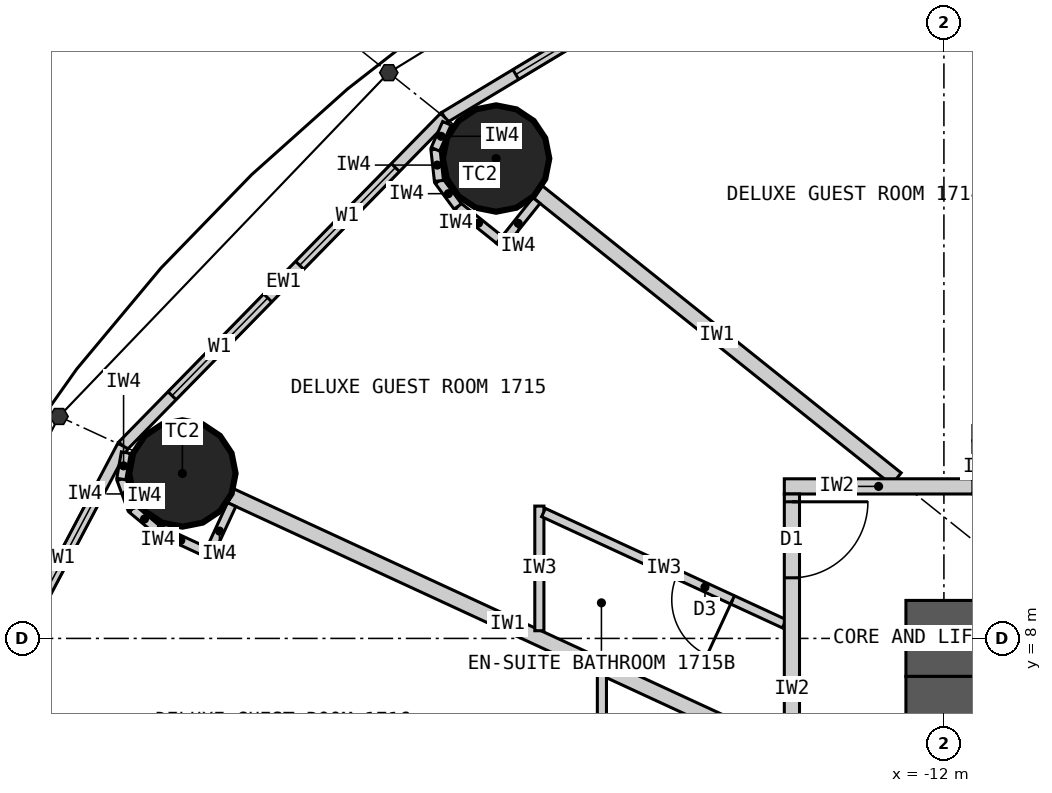
"""IFC4 building model, lengths in metres.
Left out: names, types, materials, properties, quantities, classifications, styles, units other than length and angle.
Written with IfcOpenShell. Run it as: python <this file> out.ifc"""

import sys

from ifc_helpers import new_model, si_unit, direction, frame, frame_2d, origin, origin_2d, place, context, subcontext, project, spatial, rectangle, circle, extrude, element, fill, save


model = new_model("IFC4")
c1 = context("Model", 3, precision=1e-05, world=origin(), true_north=direction((0.0, 1.0)))
c2 = subcontext(c1, "Body", "Model", "MODEL_VIEW")
j1 = project(units=[si_unit("LENGTHUNIT", "METRE"), si_unit("PLANEANGLEUNIT", "RADIAN")], contexts=[c1])
p1 = place(None, origin())
s1 = spatial("IfcSite", under=j1, at=p1, CompositionType="ELEMENT")
p2 = place(p1, origin())
s2 = spatial("IfcBuilding", under=s1, at=p2, CompositionType="ELEMENT")
p3 = place(p2, frame((0.0, 0.0, 70.5)))
s3 = spatial("IfcBuildingStorey", under=s2, at=p3, CompositionType="ELEMENT", Elevation=70.5)
for number, where, z_axis, x_axis in (
    (1, (-17.892, 14.313, 0.0), (0.0, 0.0, 1.0), (1.0, 0.0, 0.0)),
    (2, (-22.019, 10.17, 0.0), (0.0, 0.0, 1.0), (1.0, 0.0, 0.0)),
):
    element("IfcColumn", number, at=place(p3, frame(where, z_axis=z_axis, x_axis=x_axis)), inside=s3, PredefinedType="COLUMN", context=c2, shape_type="SweptSolid", body=[
        extrude(circle(Radius=0.7, at=origin_2d()), origin(), (0.0, 0.0, 1.0), 3.3),
    ])
p4 = place(p3, frame((-12.5, 8.0, 0.0), z_axis=(0.0, 0.0, 1.0), x_axis=(1.0, 0.0, 0.0)))
e3 = element("IfcWall", 3, at=p4, inside=s3, PredefinedType="SHEAR", context=c2, shape_type="SweptSolid", body=[
    extrude(rectangle(XDim=25.0, YDim=1.0, at=frame_2d((12.5, 0.0))), origin(), (0.0, 0.0, 1.0), 3.3),
])
p5 = place(p4, frame((11.2, 0.0, 0.0)))
e4 = element("IfcOpeningElement", 4, at=p5, cuts=e3, PredefinedType="OPENING", context=c2, shape_type="SweptSolid", body=[
    extrude(rectangle(XDim=1.2, YDim=2.2, at=frame_2d((0.6, 1.1))), frame((0.0, 0.51, 0.0), z_axis=(0.0, -1.0, 0.0), x_axis=(1.0, 0.0, 0.0)), (0.0, 0.0, 1.0), 1.02),
])
p6 = place(p4, frame((18.8, 0.0, 0.0)))
e5 = element("IfcOpeningElement", 5, at=p6, cuts=e3, PredefinedType="OPENING", context=c2, shape_type="SweptSolid", body=[
    extrude(rectangle(XDim=0.9, YDim=2.2, at=frame_2d((0.45, 1.1))), frame((0.0, 0.51, 0.0), z_axis=(0.0, -1.0, 0.0), x_axis=(1.0, 0.0, 0.0)), (0.0, 0.0, 1.0), 1.02),
])
p7 = place(p3, frame((-12.0, 7.5, 0.0), z_axis=(0.0, 0.0, 1.0), x_axis=(0.0, -1.0, 0.0)))
e6 = element("IfcWall", 6, at=p7, inside=s3, PredefinedType="SHEAR", context=c2, shape_type="SweptSolid", body=[
    extrude(rectangle(XDim=15.0, YDim=1.0, at=frame_2d((7.5, 0.0))), origin(), (0.0, 0.0, 1.0), 3.3),
])
p8 = place(p7, frame((6.6, 0.0, 0.0)))
e7 = element("IfcOpeningElement", 7, at=p8, cuts=e6, PredefinedType="OPENING", context=c2, shape_type="SweptSolid", body=[
    extrude(rectangle(XDim=1.8, YDim=2.2, at=frame_2d((0.9, 1.1))), frame((0.0, 0.51, 0.0), z_axis=(0.0, -1.0, 0.0), x_axis=(1.0, 0.0, 0.0)), (0.0, 0.0, 1.0), 1.02),
])
p9 = place(p3, frame((-13.096, 18.147, 0.0), z_axis=(0.0, 0.0, 1.0), x_axis=(-0.856983180864, -0.515344377787, 0.0)))
e8 = element("IfcWall", 8, at=p9, inside=s3, PredefinedType="ELEMENTEDWALL", context=c2, shape_type="SweptSolid", body=[
    extrude(rectangle(XDim=6.386, YDim=0.15, at=frame_2d((3.193, 0.0))), origin(), (0.0, 0.0, 1.0), 3.12),
])
p10 = place(p9, frame((1.093, 0.0, 0.9)))
e9 = element("IfcOpeningElement", 9, at=p10, cuts=e8, PredefinedType="OPENING", context=c2, shape_type="SweptSolid", body=[
    extrude(rectangle(XDim=1.8, YDim=1.9, at=frame_2d((0.9, 0.95))), frame((0.0, 0.085, 0.0), z_axis=(0.0, -1.0, 0.0), x_axis=(1.0, 0.0, 0.0)), (0.0, 0.0, 1.0), 0.17),
])
p11 = place(p9, frame((3.493, 0.0, 0.9)))
e10 = element("IfcOpeningElement", 10, at=p11, cuts=e8, PredefinedType="OPENING", context=c2, shape_type="SweptSolid", body=[
    extrude(rectangle(XDim=1.8, YDim=1.9, at=frame_2d((0.9, 0.95))), frame((0.0, 0.085, 0.0), z_axis=(0.0, -1.0, 0.0), x_axis=(1.0, 0.0, 0.0)), (0.0, 0.0, 1.0), 0.17),
])
p12 = place(p3, frame((-18.57, 14.856, 0.0), z_axis=(0.0, 0.0, 1.0), x_axis=(-0.699602905915, -0.714531856557, 0.0)))
e11 = element("IfcWall", 11, at=p12, inside=s3, PredefinedType="ELEMENTEDWALL", context=c2, shape_type="SweptSolid", body=[
    extrude(rectangle(XDim=6.051, YDim=0.15, at=frame_2d((3.025, 0.0))), origin(), (0.0, 0.0, 1.0), 3.12),
])
p13 = place(p12, frame((0.926, 0.0, 0.9)))
e12 = element("IfcOpeningElement", 12, at=p13, cuts=e11, PredefinedType="OPENING", context=c2, shape_type="SweptSolid", body=[
    extrude(rectangle(XDim=1.8, YDim=1.9, at=frame_2d((0.9, 0.95))), frame((0.0, 0.085, 0.0), z_axis=(0.0, -1.0, 0.0), x_axis=(1.0, 0.0, 0.0)), (0.0, 0.0, 1.0), 0.17),
])
p14 = place(p12, frame((3.325, 0.0, 0.9)))
e13 = element("IfcOpeningElement", 13, at=p14, cuts=e11, PredefinedType="OPENING", context=c2, shape_type="SweptSolid", body=[
    extrude(rectangle(XDim=1.8, YDim=1.9, at=frame_2d((0.9, 0.95))), frame((0.0, 0.085, 0.0), z_axis=(0.0, -1.0, 0.0), x_axis=(1.0, 0.0, 0.0)), (0.0, 0.0, 1.0), 0.17),
])
p15 = place(p3, frame((-22.803, 10.532, 0.0), z_axis=(0.0, 0.0, 1.0), x_axis=(-0.467296867008, -0.884100468321, 0.0)))
e14 = element("IfcWall", 14, at=p15, inside=s3, PredefinedType="ELEMENTEDWALL", context=c2, shape_type="SweptSolid", body=[
    extrude(rectangle(XDim=5.734, YDim=0.15, at=frame_2d((2.867, 0.0))), origin(), (0.0, 0.0, 1.0), 3.12),
])
p16 = place(p15, frame((0.767, 0.0, 0.9)))
e15 = element("IfcOpeningElement", 15, at=p16, cuts=e14, PredefinedType="OPENING", context=c2, shape_type="SweptSolid", body=[
    extrude(rectangle(XDim=1.8, YDim=1.9, at=frame_2d((0.9, 0.95))), frame((0.0, 0.085, 0.0), z_axis=(0.0, -1.0, 0.0), x_axis=(1.0, 0.0, 0.0)), (0.0, 0.0, 1.0), 0.17),
])
p17 = place(p15, frame((3.167, 0.0, 0.9)))
e16 = element("IfcOpeningElement", 16, at=p17, cuts=e14, PredefinedType="OPENING", context=c2, shape_type="SweptSolid", body=[
    extrude(rectangle(XDim=1.8, YDim=1.9, at=frame_2d((0.9, 0.95))), frame((0.0, 0.085, 0.0), z_axis=(0.0, -1.0, 0.0), x_axis=(1.0, 0.0, 0.0)), (0.0, 0.0, 1.0), 0.17),
])
p18 = place(p3, frame((-7.289, 10.1, 0.0), z_axis=(0.0, 0.0, 1.0), x_axis=(-0.585198353053, 0.810890182197, 0.0)))
e17 = element("IfcWall", 17, at=p18, inside=s3, PredefinedType="PARTITIONING", context=c2, shape_type="SweptSolid", body=[
    extrude(rectangle(XDim=8.36, YDim=0.2, at=frame_2d((4.18, 0.0))), origin(), (0.0, 0.0, 1.0), 2.32),
])
p19 = place(p3, frame((-12.625, 10.1, 0.0), z_axis=(0.0, 0.0, 1.0), x_axis=(-0.780892451574, 0.624665493744, 0.0)))
e18 = element("IfcWall", 18, at=p19, inside=s3, PredefinedType="PARTITIONING", context=c2, shape_type="SweptSolid", body=[
    extrude(rectangle(XDim=6.045, YDim=0.2, at=frame_2d((3.022, 0.0))), origin(), (0.0, 0.0, 1.0), 2.32),
])
p20 = place(p3, frame((-14.1, 6.512, 0.0), z_axis=(0.0, 0.0, 1.0), x_axis=(-0.907832871056, 0.419332181247, 0.0)))
e19 = element("IfcWall", 19, at=p20, inside=s3, PredefinedType="PARTITIONING", context=c2, shape_type="SweptSolid", body=[
    extrude(rectangle(XDim=8.023, YDim=0.2, at=frame_2d((4.011, 0.0))), origin(), (0.0, 0.0, 1.0), 2.32),
])
p21 = place(p3, frame((-17.323, 8.101, 0.0), z_axis=(0.0, 0.0, 1.0), x_axis=(0.0, 1.0, 0.0)))
e20 = element("IfcWall", 20, at=p21, inside=s3, PredefinedType="PARTITIONING", context=c2, shape_type="SweptSolid", body=[
    extrude(rectangle(XDim=1.64, YDim=0.12, at=frame_2d((0.82, 0.0))), origin(), (0.0, 0.0, 1.0), 3.12),
])
p22 = place(p3, frame((-14.1, 8.193, 0.0), z_axis=(0.0, 0.0, 1.0), x_axis=(-0.907836493557, 0.419324338628, 0.0)))
e21 = element("IfcWall", 21, at=p22, inside=s3, PredefinedType="PARTITIONING", context=c2, shape_type="SweptSolid", body=[
    extrude(rectangle(XDim=3.49, YDim=0.12, at=frame_2d((1.745, 0.0))), origin(), (0.0, 0.0, 1.0), 3.12),
])
p23 = place(p22, frame((0.75, 0.0, 0.0)))
e22 = element("IfcOpeningElement", 22, at=p23, cuts=e21, PredefinedType="OPENING", context=c2, shape_type="SweptSolid", body=[
    extrude(rectangle(XDim=0.8, YDim=2.1, at=frame_2d((0.4, 1.05))), frame((0.0, 0.07, 0.0), z_axis=(0.0, -1.0, 0.0), x_axis=(1.0, 0.0, 0.0)), (0.0, 0.0, 1.0), 0.14),
])
p24 = place(p3, frame((-16.5, 7.521, 0.0), z_axis=(0.0, 0.0, 1.0), x_axis=(0.0, -1.0, 0.0)))
e23 = element("IfcWall", 23, at=p24, inside=s3, PredefinedType="PARTITIONING", context=c2, shape_type="SweptSolid", body=[
    extrude(rectangle(XDim=2.749, YDim=0.12, at=frame_2d((1.374, 0.0))), origin(), (0.0, 0.0, 1.0), 3.12),
])
p25 = place(p3, frame((-14.1, 10.0, 0.0), z_axis=(0.0, 0.0, 1.0), x_axis=(1.0, 0.0, 0.0)))
e24 = element("IfcWall", 24, at=p25, inside=s3, PredefinedType="PARTITIONING", context=c2, shape_type="SweptSolid", body=[
    extrude(rectangle(XDim=2.481, YDim=0.2, at=frame_2d((1.24, 0.0))), origin(), (0.0, 0.0, 1.0), 3.12),
])
p26 = place(p3, frame((-14.0, 9.9, 0.0), z_axis=(0.0, 0.0, 1.0), x_axis=(0.0, -1.0, 0.0)))
e25 = element("IfcWall", 25, at=p26, inside=s3, PredefinedType="PARTITIONING", context=c2, shape_type="SweptSolid", body=[
    extrude(rectangle(XDim=5.127, YDim=0.2, at=frame_2d((2.564, 0.0))), origin(), (0.0, 0.0, 1.0), 3.12),
])
p27 = place(p26, frame((0.103, 0.0, 0.0)))
e26 = element("IfcOpeningElement", 26, at=p27, cuts=e25, PredefinedType="OPENING", context=c2, shape_type="SweptSolid", body=[
    extrude(rectangle(XDim=1.0, YDim=2.2, at=frame_2d((0.5, 1.1))), frame((0.0, 0.11, 0.0), z_axis=(0.0, -1.0, 0.0), x_axis=(1.0, 0.0, 0.0)), (0.0, 0.0, 1.0), 0.22),
])
p28 = place(p3, frame((-17.361, 13.76, 0.0), z_axis=(0.0, 0.0, 1.0), x_axis=(-0.624501042889, -0.781023973659, 0.0)))
e27 = element("IfcWall", 27, at=p28, inside=s3, PredefinedType="PARTITIONING", context=c2, shape_type="SweptSolid", body=[
    extrude(rectangle(XDim=0.767, YDim=0.12, at=frame_2d((0.384, 0.0))), origin(), (0.0, 0.0, 1.0), 3.12),
])
p29 = place(p3, frame((-17.85, 13.246, 0.0), z_axis=(0.0, 0.0, 1.0), x_axis=(-0.780902834923, 0.62465251333, 0.0)))
e28 = element("IfcWall", 28, at=p29, inside=s3, PredefinedType="PARTITIONING", context=c2, shape_type="SweptSolid", body=[
    extrude(rectangle(XDim=0.7, YDim=0.12, at=frame_2d((0.35, 0.0))), origin(), (0.0, 0.0, 1.0), 3.12),
])
for number, where, z_axis, x_axis in (
    (29, (-18.396, 13.683, 0.0), (0.0, 0.0, 1.0), (-0.592, 0.806, 0.0)),
    (30, (-18.644, 14.02, 0.0), (0.0, 0.0, 1.0), (-0.11, 0.994, 0.0)),
):
    element("IfcWall", number, at=place(p3, frame(where, z_axis=z_axis, x_axis=x_axis)), inside=s3, PredefinedType="PARTITIONING", context=c2, shape_type="SweptSolid", body=[
        extrude(rectangle(XDim=0.418, YDim=0.12, at=frame_2d((0.209, 0.0))), origin(), (0.0, 0.0, 1.0), 3.12),
    ])
p30 = place(p3, frame((-18.69, 14.435, 0.0), z_axis=(0.0, 0.0, 1.0), x_axis=(0.401093412634, 0.91603715773, 0.0)))
e31 = element("IfcWall", 31, at=p30, inside=s3, PredefinedType="PARTITIONING", context=c2, shape_type="SweptSolid", body=[
    extrude(rectangle(XDim=0.373, YDim=0.12, at=frame_2d((0.187, 0.0))), origin(), (0.0, 0.0, 1.0), 3.12),
])
p31 = place(p3, frame((-21.371, 9.761, 0.0), z_axis=(0.0, 0.0, 1.0), x_axis=(-0.419259891039, -0.907866258744, 0.0)))
e32 = element("IfcWall", 32, at=p31, inside=s3, PredefinedType="PARTITIONING", context=c2, shape_type="SweptSolid", body=[
    extrude(rectangle(XDim=0.768, YDim=0.12, at=frame_2d((0.384, 0.0))), origin(), (0.0, 0.0, 1.0), 3.12),
])
p32 = place(p3, frame((-21.722, 9.144, 0.0), z_axis=(0.0, 0.0, 1.0), x_axis=(-0.907877701396, 0.419235112208, 0.0)))
e33 = element("IfcWall", 33, at=p32, inside=s3, PredefinedType="PARTITIONING", context=c2, shape_type="SweptSolid", body=[
    extrude(rectangle(XDim=0.7, YDim=0.12, at=frame_2d((0.35, 0.0))), origin(), (0.0, 0.0, 1.0), 3.12),
])
p33 = place(p3, frame((-22.358, 9.437, 0.0), z_axis=(0.0, 0.0, 1.0), x_axis=(-0.768412687942, 0.639954639806, 0.0)))
e34 = element("IfcWall", 34, at=p33, inside=s3, PredefinedType="PARTITIONING", context=c2, shape_type="SweptSolid", body=[
    extrude(rectangle(XDim=0.418, YDim=0.12, at=frame_2d((0.209, 0.0))), origin(), (0.0, 0.0, 1.0), 3.12),
])
p34 = place(p3, frame((-22.679, 9.705, 0.0), z_axis=(0.0, 0.0, 1.0), x_axis=(-0.345164001646, 0.938542386879, 0.0)))
e35 = element("IfcWall", 35, at=p34, inside=s3, PredefinedType="PARTITIONING", context=c2, shape_type="SweptSolid", body=[
    extrude(rectangle(XDim=0.418, YDim=0.12, at=frame_2d((0.209, 0.0))), origin(), (0.0, 0.0, 1.0), 3.12),
])
p35 = place(p3, frame((-22.823, 10.097, 0.0), z_axis=(0.0, 0.0, 1.0), x_axis=(0.169674995186, 0.985500074079, 0.0)))
e36 = element("IfcWall", 36, at=p35, inside=s3, PredefinedType="PARTITIONING", context=c2, shape_type="SweptSolid", body=[
    extrude(rectangle(XDim=0.353, YDim=0.12, at=frame_2d((0.176, 0.0))), origin(), (0.0, 0.0, 1.0), 3.12),
])
p36 = place(p11, origin())
e37 = element("IfcWindow", 37, at=p36, inside=s3, PartitioningType="SINGLE_PANEL", PredefinedType="WINDOW", context=c2, shape_type="SweptSolid", body=[
    extrude(rectangle(XDim=1.8, YDim=1.9, at=frame_2d((0.9, 0.95))), frame((0.0, 0.03, 0.0), z_axis=(0.0, -1.0, 0.0), x_axis=(1.0, 0.0, 0.0)), (0.0, 0.0, 1.0), 0.06),
])
fill(e10, e37)
p37 = place(p13, origin())
e38 = element("IfcWindow", 38, at=p37, inside=s3, PartitioningType="SINGLE_PANEL", PredefinedType="WINDOW", context=c2, shape_type="SweptSolid", body=[
    extrude(rectangle(XDim=1.8, YDim=1.9, at=frame_2d((0.9, 0.95))), frame((0.0, 0.03, 0.0), z_axis=(0.0, -1.0, 0.0), x_axis=(1.0, 0.0, 0.0)), (0.0, 0.0, 1.0), 0.06),
])
fill(e12, e38)
p38 = place(p14, origin())
e39 = element("IfcWindow", 39, at=p38, inside=s3, PartitioningType="SINGLE_PANEL", PredefinedType="WINDOW", context=c2, shape_type="SweptSolid", body=[
    extrude(rectangle(XDim=1.8, YDim=1.9, at=frame_2d((0.9, 0.95))), frame((0.0, 0.03, 0.0), z_axis=(0.0, -1.0, 0.0), x_axis=(1.0, 0.0, 0.0)), (0.0, 0.0, 1.0), 0.06),
])
fill(e13, e39)
p39 = place(p16, origin())
e40 = element("IfcWindow", 40, at=p39, inside=s3, PartitioningType="SINGLE_PANEL", PredefinedType="WINDOW", context=c2, shape_type="SweptSolid", body=[
    extrude(rectangle(XDim=1.8, YDim=1.9, at=frame_2d((0.9, 0.95))), frame((0.0, 0.03, 0.0), z_axis=(0.0, -1.0, 0.0), x_axis=(1.0, 0.0, 0.0)), (0.0, 0.0, 1.0), 0.06),
])
fill(e15, e40)
p40 = place(p23, origin())
e41 = element("IfcDoor", 41, at=p40, inside=s3, OperationType="SINGLE_SWING_LEFT", PredefinedType="DOOR", context=c2, shape_type="SweptSolid", body=[
    extrude(rectangle(XDim=0.8, YDim=2.1, at=frame_2d((0.4, 1.05))), frame((0.0, 0.025, 0.0), z_axis=(0.0, -1.0, 0.0), x_axis=(1.0, 0.0, 0.0)), (0.0, 0.0, 1.0), 0.05),
])
fill(e22, e41)
p41 = place(p27, origin())
e42 = element("IfcDoor", 42, at=p41, inside=s3, OperationType="SINGLE_SWING_LEFT", PredefinedType="DOOR", context=c2, shape_type="SweptSolid", body=[
    extrude(rectangle(XDim=1.0, YDim=2.2, at=frame_2d((0.5, 1.1))), frame((0.0, 0.025, 0.0), z_axis=(0.0, -1.0, 0.0), x_axis=(1.0, 0.0, 0.0)), (0.0, 0.0, 1.0), 0.05),
])
fill(e26, e42)
save(model, sys.argv[1])
